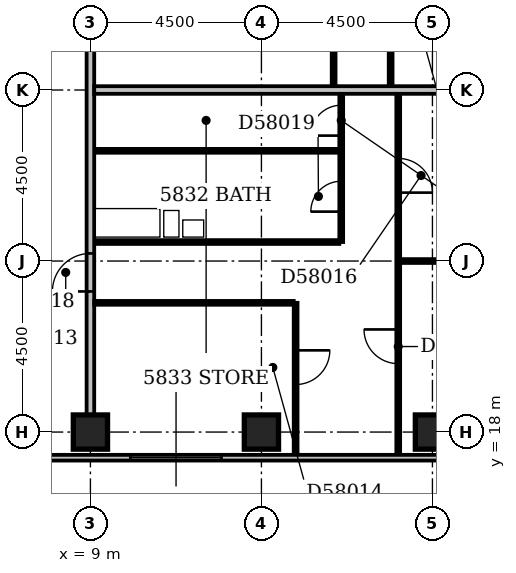
"""IFC4 building model, lengths in metres.
Left out: names, types, materials, properties, quantities, classifications, styles, units other than length and angle.
Written with IfcOpenShell. Run it as: python <this file> out.ifc"""

import sys

from ifc_helpers import new_model, si_unit, direction, frame, frame_2d, origin, origin_2d, place, context, subcontext, project, spatial, rectangle, extrude, element, fill, save


model = new_model("IFC4")
c1 = context("Model", 3, precision=1e-05, world=origin(), true_north=direction((0.0, 1.0)))
c2 = subcontext(c1, "Body", "Model", "MODEL_VIEW")
j1 = project(units=[si_unit("LENGTHUNIT", "METRE"), si_unit("PLANEANGLEUNIT", "RADIAN")], contexts=[c1])
p1 = place(None, origin())
s1 = spatial("IfcSite", under=j1, at=p1, CompositionType="ELEMENT")
p2 = place(p1, origin())
s2 = spatial("IfcBuilding", under=s1, at=p2, CompositionType="ELEMENT")
p3 = place(p2, frame((0.0, 0.0, 225.8)))
s3 = spatial("IfcBuildingStorey", under=s2, at=p3, CompositionType="ELEMENT", Elevation=225.8)
for number, where, z_axis, x_axis in (
    (1, (9.0, 18.0, -0.3), (0.0, 0.0, 1.0), (1.0, 0.0, 0.0)),
    (2, (13.5, 18.0, -0.3), (0.0, 0.0, 1.0), (1.0, 0.0, 0.0)),
    (3, (18.0, 18.0, -0.3), (0.0, 0.0, 1.0), (1.0, 0.0, 0.0)),
):
    element("IfcColumn", number, at=place(p3, frame(where, z_axis=z_axis, x_axis=x_axis)), inside=s3, PredefinedType="COLUMN", context=c2, shape_type="SweptSolid", body=[
        extrude(rectangle(XDim=0.9, YDim=0.9, at=origin_2d()), origin(), (0.0, 0.0, 1.0), 3.6),
    ])
p4 = place(p3, frame((3.9, 17.325, 0.0), z_axis=(0.0, 0.0, 1.0), x_axis=(1.0, 0.0, 0.0)))
e4 = element("IfcWall", 4, at=p4, inside=s3, PredefinedType="STANDARD", context=c2, shape_type="SweptSolid", body=[
    extrude(rectangle(XDim=19.35, YDim=0.15, at=frame_2d((9.675, 0.0))), origin(), (0.0, 0.0, 1.0), 2.7),
])
p5 = place(p4, frame((6.15, 0.0, 0.6)))
e5 = element("IfcOpeningElement", 5, at=p5, cuts=e4, PredefinedType="OPENING", context=c2, shape_type="SweptSolid", body=[
    extrude(rectangle(XDim=2.4, YDim=1.8, at=frame_2d((1.2, 0.9))), frame((0.0, 0.087, 0.0), z_axis=(0.0, -1.0, 0.0), x_axis=(1.0, 0.0, 0.0)), (0.0, 0.0, 1.0), 0.174),
])
p6 = place(p4, frame((15.423, 0.0, 0.6)))
e6 = element("IfcOpeningElement", 6, at=p6, cuts=e4, PredefinedType="OPENING", context=c2, shape_type="SweptSolid", body=[
    extrude(rectangle(XDim=2.4, YDim=1.8, at=frame_2d((1.2, 0.9))), frame((0.0, 0.087, 0.0), z_axis=(0.0, -1.0, 0.0), x_axis=(1.0, 0.0, 0.0)), (0.0, 0.0, 1.0), 0.174),
])
p7 = place(p3, frame((14.4, 17.4, 0.0), z_axis=(0.0, 0.0, 1.0), x_axis=(0.0, 1.0, 0.0)))
e7 = element("IfcWall", 7, at=p7, inside=s3, PredefinedType="PARTITIONING", context=c2, shape_type="SweptSolid", body=[
    extrude(rectangle(XDim=4.0, YDim=0.1, at=frame_2d((2.0, 0.0))), origin(), (0.0, 0.0, 1.0), 3.3),
])
p8 = place(p7, frame((1.85, 0.0, 0.0)))
e8 = element("IfcOpeningElement", 8, at=p8, cuts=e7, PredefinedType="OPENING", context=c2, shape_type="SweptSolid", body=[
    extrude(rectangle(XDim=0.9, YDim=2.1, at=frame_2d((0.45, 1.05))), frame((0.0, 0.062, 0.0), z_axis=(0.0, -1.0, 0.0), x_axis=(1.0, 0.0, 0.0)), (0.0, 0.0, 1.0), 0.124),
])
p9 = place(p3, frame((17.1, 17.4, 0.0), z_axis=(0.0, 0.0, 1.0), x_axis=(0.0, 1.0, 0.0)))
e9 = element("IfcWall", 9, at=p9, inside=s3, PredefinedType="PARTITIONING", context=c2, shape_type="SweptSolid", body=[
    extrude(rectangle(XDim=9.5, YDim=0.1, at=frame_2d((4.75, 0.0))), origin(), (0.0, 0.0, 1.0), 3.3),
])
p10 = place(p9, frame((2.4, 0.0, 0.0)))
e10 = element("IfcOpeningElement", 10, at=p10, cuts=e9, PredefinedType="OPENING", context=c2, shape_type="SweptSolid", body=[
    extrude(rectangle(XDim=0.9, YDim=2.1, at=frame_2d((0.45, 1.05))), frame((0.0, 0.062, 0.0), z_axis=(0.0, -1.0, 0.0), x_axis=(1.0, 0.0, 0.0)), (0.0, 0.0, 1.0), 0.124),
])
p11 = place(p9, frame((6.9, 0.0, 0.0)))
e11 = element("IfcOpeningElement", 11, at=p11, cuts=e9, PredefinedType="OPENING", context=c2, shape_type="SweptSolid", body=[
    extrude(rectangle(XDim=0.9, YDim=2.1, at=frame_2d((0.45, 1.05))), frame((0.0, 0.062, 0.0), z_axis=(0.0, -1.0, 0.0), x_axis=(1.0, 0.0, 0.0)), (0.0, 0.0, 1.0), 0.124),
])
p12 = place(p3, frame((9.0, 18.45, 0.0), z_axis=(0.0, 0.0, 1.0), x_axis=(0.0, 1.0, 0.0)))
e12 = element("IfcWall", 12, at=p12, inside=s3, PredefinedType="PARTITIONING", context=c2, shape_type="SweptSolid", body=[
    extrude(rectangle(XDim=17.55, YDim=0.2, at=frame_2d((8.775, 0.0))), origin(), (0.0, 0.0, 1.0), 3.3),
])
p13 = place(p12, frame((13.85, 0.0, 0.0)))
e13 = element("IfcOpeningElement", 13, at=p13, cuts=e12, PredefinedType="OPENING", context=c2, shape_type="SweptSolid", body=[
    extrude(rectangle(XDim=1.0, YDim=2.1, at=frame_2d((0.5, 1.05))), frame((0.0, 0.112, 0.0), z_axis=(0.0, -1.0, 0.0), x_axis=(1.0, 0.0, 0.0)), (0.0, 0.0, 1.0), 0.224),
])
p14 = place(p12, frame((3.25, 0.0, 0.0)))
e14 = element("IfcOpeningElement", 14, at=p14, cuts=e12, PredefinedType="OPENING", context=c2, shape_type="SweptSolid", body=[
    extrude(rectangle(XDim=1.0, YDim=2.1, at=frame_2d((0.5, 1.05))), frame((0.0, 0.112, 0.0), z_axis=(0.0, -1.0, 0.0), x_axis=(1.0, 0.0, 0.0)), (0.0, 0.0, 1.0), 0.224),
])
p15 = place(p3, frame((9.1, 21.4, 0.0), z_axis=(0.0, 0.0, 1.0), x_axis=(1.0, 0.0, 0.0)))
e15 = element("IfcWall", 15, at=p15, inside=s3, PredefinedType="PARTITIONING", context=c2, shape_type="SweptSolid", body=[
    extrude(rectangle(XDim=5.25, YDim=0.1, at=frame_2d((2.625, 0.0))), origin(), (0.0, 0.0, 1.0), 3.3),
])
p16 = place(p3, frame((17.15, 22.5, 0.0), z_axis=(0.0, 0.0, 1.0), x_axis=(1.0, 0.0, 0.0)))
e16 = element("IfcWall", 16, at=p16, inside=s3, PredefinedType="PARTITIONING", context=c2, shape_type="SweptSolid", body=[
    extrude(rectangle(XDim=4.9, YDim=0.1, at=frame_2d((2.45, 0.0))), origin(), (0.0, 0.0, 1.0), 3.3),
])
p17 = place(p3, frame((9.1, 23.0, 0.0), z_axis=(0.0, 0.0, 1.0), x_axis=(1.0, 0.0, 0.0)))
e17 = element("IfcWall", 17, at=p17, inside=s3, PredefinedType="PLUMBINGWALL", context=c2, shape_type="SweptSolid", body=[
    extrude(rectangle(XDim=6.45, YDim=0.1, at=frame_2d((3.225, 0.0))), origin(), (0.0, 0.0, 1.0), 3.3),
])
p18 = place(p3, frame((15.6, 23.0, 0.0), z_axis=(0.0, 0.0, 1.0), x_axis=(0.0, 1.0, 0.0)))
e18 = element("IfcWall", 18, at=p18, inside=s3, PredefinedType="PARTITIONING", context=c2, shape_type="SweptSolid", body=[
    extrude(rectangle(XDim=3.9, YDim=0.1, at=frame_2d((1.95, 0.0))), origin(), (0.0, 0.0, 1.0), 3.3),
])
p19 = place(p18, frame((0.8, 0.0, 0.0)))
e19 = element("IfcOpeningElement", 19, at=p19, cuts=e18, PredefinedType="OPENING", context=c2, shape_type="SweptSolid", body=[
    extrude(rectangle(XDim=0.8, YDim=2.1, at=frame_2d((0.4, 1.05))), frame((0.0, 0.062, 0.0), z_axis=(0.0, -1.0, 0.0), x_axis=(1.0, 0.0, 0.0)), (0.0, 0.0, 1.0), 0.124),
])
p20 = place(p18, frame((2.8, 0.0, 0.0)))
e20 = element("IfcOpeningElement", 20, at=p20, cuts=e18, PredefinedType="OPENING", context=c2, shape_type="SweptSolid", body=[
    extrude(rectangle(XDim=0.8, YDim=2.1, at=frame_2d((0.4, 1.05))), frame((0.0, 0.062, 0.0), z_axis=(0.0, -1.0, 0.0), x_axis=(1.0, 0.0, 0.0)), (0.0, 0.0, 1.0), 0.124),
])
p21 = place(p3, frame((9.1, 25.4, 0.0), z_axis=(0.0, 0.0, 1.0), x_axis=(1.0, 0.0, 0.0)))
e21 = element("IfcWall", 21, at=p21, inside=s3, PredefinedType="PLUMBINGWALL", context=c2, shape_type="SweptSolid", body=[
    extrude(rectangle(XDim=6.45, YDim=0.1, at=frame_2d((3.225, 0.0))), origin(), (0.0, 0.0, 1.0), 3.3),
])
p22 = place(p3, frame((9.1, 27.0, 0.0), z_axis=(0.0, 0.0, 1.0), x_axis=(1.0, 0.0, 0.0)))
e22 = element("IfcWall", 22, at=p22, inside=s3, PredefinedType="PARTITIONING", context=c2, shape_type="SweptSolid", body=[
    extrude(rectangle(XDim=12.95, YDim=0.2, at=frame_2d((6.475, 0.0))), origin(), (0.0, 0.0, 1.0), 2.7),
])
p23 = place(p3, frame((15.4, 27.1, 0.0), z_axis=(0.0, 0.0, 1.0), x_axis=(0.0, 1.0, 0.0)))
e23 = element("IfcWall", 23, at=p23, inside=s3, PredefinedType="PARTITIONING", context=c2, shape_type="SweptSolid", body=[
    extrude(rectangle(XDim=4.9, YDim=0.1, at=frame_2d((2.45, 0.0))), origin(), (0.0, 0.0, 1.0), 3.3),
])
p24 = place(p23, frame((1.95, 0.0, 0.0)))
e24 = element("IfcOpeningElement", 24, at=p24, cuts=e23, PredefinedType="OPENING", context=c2, shape_type="SweptSolid", body=[
    extrude(rectangle(XDim=0.9, YDim=2.1, at=frame_2d((0.45, 1.05))), frame((0.0, 0.062, 0.0), z_axis=(0.0, -1.0, 0.0), x_axis=(1.0, 0.0, 0.0)), (0.0, 0.0, 1.0), 0.124),
])
p25 = place(p3, frame((16.9, 27.1, 0.0), z_axis=(0.0, 0.0, 1.0), x_axis=(0.0, 1.0, 0.0)))
e25 = element("IfcWall", 25, at=p25, inside=s3, PredefinedType="PARTITIONING", context=c2, shape_type="SweptSolid", body=[
    extrude(rectangle(XDim=8.8, YDim=0.1, at=frame_2d((4.4, 0.0))), origin(), (0.0, 0.0, 1.0), 3.3),
])
p26 = place(p25, frame((1.7, 0.0, 0.0)))
e26 = element("IfcOpeningElement", 26, at=p26, cuts=e25, PredefinedType="OPENING", context=c2, shape_type="SweptSolid", body=[
    extrude(rectangle(XDim=0.9, YDim=2.1, at=frame_2d((0.45, 1.05))), frame((0.0, 0.062, 0.0), z_axis=(0.0, -1.0, 0.0), x_axis=(1.0, 0.0, 0.0)), (0.0, 0.0, 1.0), 0.124),
])
p27 = place(p25, frame((5.05, 0.0, 0.0)))
e27 = element("IfcOpeningElement", 27, at=p27, cuts=e25, PredefinedType="OPENING", context=c2, shape_type="SweptSolid", body=[
    extrude(rectangle(XDim=0.9, YDim=2.1, at=frame_2d((0.45, 1.05))), frame((0.0, 0.062, 0.0), z_axis=(0.0, -1.0, 0.0), x_axis=(1.0, 0.0, 0.0)), (0.0, 0.0, 1.0), 0.124),
])
p28 = place(p5, origin())
e28 = element("IfcWindow", 28, at=p28, inside=s3, PartitioningType="SINGLE_PANEL", PredefinedType="WINDOW", context=c2, shape_type="SweptSolid", body=[
    extrude(rectangle(XDim=2.4, YDim=1.8, at=frame_2d((1.2, 0.9))), frame((0.0, 0.03, 0.0), z_axis=(0.0, -1.0, 0.0), x_axis=(1.0, 0.0, 0.0)), (0.0, 0.0, 1.0), 0.06),
])
fill(e5, e28)
p29 = place(p8, origin())
e29 = element("IfcDoor", 29, at=p29, inside=s3, OperationType="SINGLE_SWING_RIGHT", PredefinedType="DOOR", context=c2, shape_type="SweptSolid", body=[
    extrude(rectangle(XDim=0.9, YDim=2.1, at=frame_2d((0.45, 1.05))), frame((0.0, 0.025, 0.0), z_axis=(0.0, -1.0, 0.0), x_axis=(1.0, 0.0, 0.0)), (0.0, 0.0, 1.0), 0.05),
])
fill(e8, e29)
p30 = place(p10, frame((0.9, 0.0, 0.0), z_axis=(0.0, 0.0, 1.0), x_axis=(-1.0, 0.0, 0.0)))
e30 = element("IfcDoor", 30, at=p30, inside=s3, OperationType="SINGLE_SWING_LEFT", PredefinedType="DOOR", context=c2, shape_type="SweptSolid", body=[
    extrude(rectangle(XDim=0.9, YDim=2.1, at=frame_2d((0.45, 1.05))), frame((0.0, 0.025, 0.0), z_axis=(0.0, -1.0, 0.0), x_axis=(1.0, 0.0, 0.0)), (0.0, 0.0, 1.0), 0.05),
])
fill(e10, e30)
p31 = place(p11, frame((0.9, 0.0, 0.0), z_axis=(0.0, 0.0, 1.0), x_axis=(-1.0, 0.0, 0.0)))
e31 = element("IfcDoor", 31, at=p31, inside=s3, OperationType="SINGLE_SWING_RIGHT", PredefinedType="DOOR", context=c2, shape_type="SweptSolid", body=[
    extrude(rectangle(XDim=0.9, YDim=2.1, at=frame_2d((0.45, 1.05))), frame((0.0, 0.025, 0.0), z_axis=(0.0, -1.0, 0.0), x_axis=(1.0, 0.0, 0.0)), (0.0, 0.0, 1.0), 0.05),
])
fill(e11, e31)
p32 = place(p14, origin())
e32 = element("IfcDoor", 32, at=p32, inside=s3, OperationType="SINGLE_SWING_LEFT", PredefinedType="DOOR", context=c2, shape_type="SweptSolid", body=[
    extrude(rectangle(XDim=1.0, YDim=2.1, at=frame_2d((0.5, 1.05))), frame((0.0, 0.025, 0.0), z_axis=(0.0, -1.0, 0.0), x_axis=(1.0, 0.0, 0.0)), (0.0, 0.0, 1.0), 0.05),
])
fill(e14, e32)
p33 = place(p19, origin())
e33 = element("IfcDoor", 33, at=p33, inside=s3, OperationType="SINGLE_SWING_LEFT", PredefinedType="DOOR", context=c2, shape_type="SweptSolid", body=[
    extrude(rectangle(XDim=0.8, YDim=2.1, at=frame_2d((0.4, 1.05))), frame((0.0, 0.025, 0.0), z_axis=(0.0, -1.0, 0.0), x_axis=(1.0, 0.0, 0.0)), (0.0, 0.0, 1.0), 0.05),
])
fill(e19, e33)
p34 = place(p20, origin())
e34 = element("IfcDoor", 34, at=p34, inside=s3, OperationType="SINGLE_SWING_LEFT", PredefinedType="DOOR", context=c2, shape_type="SweptSolid", body=[
    extrude(rectangle(XDim=0.8, YDim=2.1, at=frame_2d((0.4, 1.05))), frame((0.0, 0.025, 0.0), z_axis=(0.0, -1.0, 0.0), x_axis=(1.0, 0.0, 0.0)), (0.0, 0.0, 1.0), 0.05),
])
fill(e20, e34)
save(model, sys.argv[1])
